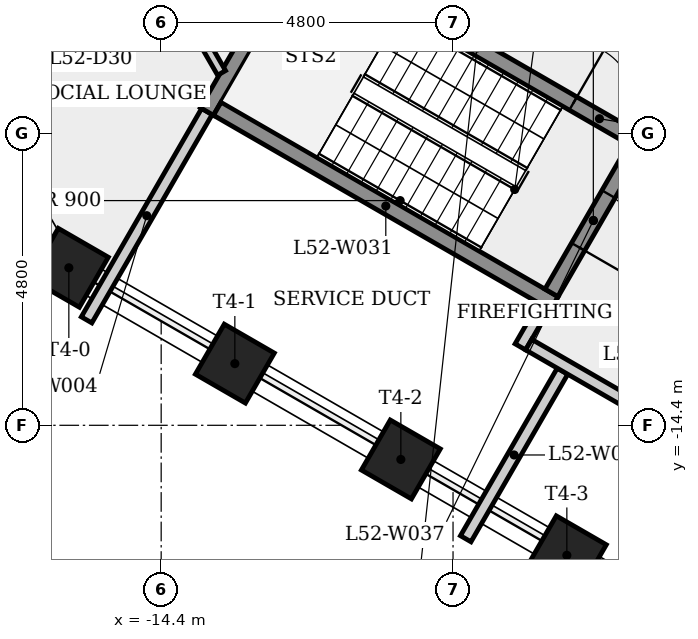
"""IFC4 building model, lengths in metres.
Left out: names, types, materials, properties, quantities, classifications, styles, units other than length and angle.
Written with IfcOpenShell. Run it as: python <this file> out.ifc"""

import sys

from ifc_helpers import new_model, si_unit, direction, frame, frame_2d, origin, origin_2d, place, context, subcontext, project, spatial, rectangle, extrude, element, fill, save


model = new_model("IFC4")
c1 = context("Model", 3, precision=1e-05, world=origin(), true_north=direction((0.0, 1.0)))
c2 = subcontext(c1, "Body", "Model", "MODEL_VIEW")
j1 = project(units=[si_unit("LENGTHUNIT", "METRE"), si_unit("PLANEANGLEUNIT", "RADIAN")], contexts=[c1])
p1 = place(None, origin())
s1 = spatial("IfcSite", under=j1, at=p1, CompositionType="ELEMENT")
p2 = place(p1, origin())
s2 = spatial("IfcBuilding", under=s1, at=p2, CompositionType="ELEMENT")
p3 = place(p2, frame((0.0, 0.0, 194.7)))
s3 = spatial("IfcBuildingStorey", under=s2, at=p3, CompositionType="ELEMENT", Elevation=194.7)
p4 = place(p3, frame((-9.35, -5.225, 0.0), z_axis=(0.0, 0.0, 1.0), x_axis=(0.866023993627, -0.500002442456, 0.0)))
e1 = element("IfcWall", 1, at=p4, inside=s3, PredefinedType="SHEAR", context=c2, shape_type="SweptSolid", body=[
    extrude(rectangle(XDim=10.97, YDim=0.6, at=frame_2d((5.485, 0.0))), origin(), (0.0, 0.0, 1.0), 4.0),
])
p5 = place(p4, frame((3.891, 0.0, 0.0)))
e2 = element("IfcOpeningElement", 2, at=p5, cuts=e1, PredefinedType="OPENING", context=c2, shape_type="SweptSolid", body=[
    extrude(rectangle(XDim=0.9, YDim=2.1, at=frame_2d((0.45, 1.05))), frame((0.0, 0.31, 0.0), z_axis=(0.0, -1.0, 0.0), x_axis=(1.0, 0.0, 0.0)), (0.0, 0.0, 1.0), 0.62),
])
p6 = place(p4, frame((9.018, 0.0, 0.0)))
e3 = element("IfcOpeningElement", 3, at=p6, cuts=e1, PredefinedType="OPENING", context=c2, shape_type="SweptSolid", body=[
    extrude(rectangle(XDim=0.9, YDim=2.1, at=frame_2d((0.45, 1.05))), frame((0.0, 0.31, 0.0), z_axis=(0.0, -1.0, 0.0), x_axis=(1.0, 0.0, 0.0)), (0.0, 0.0, 1.0), 0.62),
])
for number, where, z_axis, x_axis in (
    (4, (-15.918, -11.809, 0.0), (0.0, 0.0, 1.0), (-0.5, -0.866, 0.0)),
    (5, (-13.188, -13.386, 0.0), (0.0, 0.0, 1.0), (-0.5, -0.866, 0.0)),
    (6, (-10.458, -14.962, 0.0), (0.0, 0.0, 1.0), (-0.5, -0.866, 0.0)),
    (7, (-7.728, -16.538, 0.0), (0.0, 0.0, 1.0), (-0.5, -0.866, 0.0)),
):
    element("IfcColumn", number, at=place(p3, frame(where, z_axis=z_axis, x_axis=x_axis)), inside=s3, PredefinedType="COLUMN", context=c2, shape_type="SweptSolid", body=[
        extrude(rectangle(XDim=0.95, YDim=0.95, at=origin_2d()), origin(), (0.0, 0.0, 1.0), 4.0),
    ])
p7 = place(p3, frame((-15.627, -12.666, 0.0), z_axis=(0.0, 0.0, 1.0), x_axis=(0.499980548326, 0.866036633923, 0.0)))
e8 = element("IfcWall", 8, at=p7, inside=s3, PredefinedType="PLUMBINGWALL", context=c2, shape_type="SweptSolid", body=[
    extrude(rectangle(XDim=3.958, YDim=0.2, at=frame_2d((1.979, 0.0))), origin(), (0.0, 0.0, 1.0), 3.65),
])
p8 = place(p3, frame((-13.648, -9.239, 0.0), z_axis=(0.0, 0.0, 1.0), x_axis=(0.500017246033, 0.866015446554, 0.0)))
e9 = element("IfcWall", 9, at=p8, inside=s3, PredefinedType="SHEAR", context=c2, shape_type="SweptSolid", body=[
    extrude(rectangle(XDim=3.25, YDim=0.25, at=frame_2d((1.625, 0.0))), origin(), (0.0, 0.0, 1.0), 3.65),
])
p9 = place(p3, frame((-13.406, -8.604, 0.0), z_axis=(0.0, 0.0, 1.0), x_axis=(-0.499980611808, 0.866036597273, 0.0)))
e10 = element("IfcWall", 10, at=p9, inside=s3, PredefinedType="PARTITIONING", context=c2, shape_type="SweptSolid", body=[
    extrude(rectangle(XDim=3.493, YDim=0.15, at=frame_2d((1.747, 0.0))), origin(), (0.0, 0.0, 1.0), 3.65),
])
p10 = place(p9, frame((1.246, 0.0, 0.0)))
e11 = element("IfcOpeningElement", 11, at=p10, cuts=e10, PredefinedType="OPENING", context=c2, shape_type="SweptSolid", body=[
    extrude(rectangle(XDim=1.0, YDim=2.1, at=frame_2d((0.5, 1.05))), frame((0.0, 0.085, 0.0), z_axis=(0.0, -1.0, 0.0), x_axis=(1.0, 0.0, 0.0)), (0.0, 0.0, 1.0), 0.17),
])
p11 = place(p3, frame((-11.977, -6.595, 0.0), z_axis=(0.0, 0.0, 1.0), x_axis=(0.866025499775, -0.499999833739, 0.0)))
e12 = element("IfcWall", 12, at=p11, inside=s3, PredefinedType="SHEAR", context=c2, shape_type="SweptSolid", body=[
    extrude(rectangle(XDim=6.4, YDim=0.25, at=frame_2d((3.2, 0.0))), origin(), (0.0, 0.0, 1.0), 3.65),
])
p12 = place(p11, frame((5.025, 0.0, 0.0)))
e13 = element("IfcOpeningElement", 13, at=p12, cuts=e12, PredefinedType="OPENING", context=c2, shape_type="SweptSolid", body=[
    extrude(rectangle(XDim=1.0, YDim=2.1, at=frame_2d((0.5, 1.05))), frame((0.0, 0.135, 0.0), z_axis=(0.0, -1.0, 0.0), x_axis=(1.0, 0.0, 0.0)), (0.0, 0.0, 1.0), 0.27),
])
p13 = place(p3, frame((-8.493, -13.11, 0.0), z_axis=(0.0, 0.0, 1.0), x_axis=(0.500067724834, 0.865986299303, 0.0)))
e14 = element("IfcWall", 14, at=p13, inside=s3, PredefinedType="PLUMBINGWALL", context=c2, shape_type="SweptSolid", body=[
    extrude(rectangle(XDim=0.775, YDim=0.2, at=frame_2d((0.388, 0.0))), origin(), (0.0, 0.0, 1.0), 3.65),
])
p14 = place(p3, frame((-7.935, -12.393, 0.0), z_axis=(0.0, 0.0, 1.0), x_axis=(-0.866025499775, 0.499999833739, 0.0)))
e15 = element("IfcWall", 15, at=p14, inside=s3, PredefinedType="SHEAR", context=c2, shape_type="SweptSolid", body=[
    extrude(rectangle(XDim=6.4, YDim=0.25, at=frame_2d((3.2, 0.0))), origin(), (0.0, 0.0, 1.0), 3.65),
])
p15 = place(p3, frame((-7.8, -13.51, 0.0), z_axis=(0.0, 0.0, 1.0), x_axis=(-0.500016846771, -0.866015677078, 0.0)))
e16 = element("IfcWall", 16, at=p15, inside=s3, PredefinedType="PLUMBINGWALL", context=c2, shape_type="SweptSolid", body=[
    extrude(rectangle(XDim=3.183, YDim=0.2, at=frame_2d((1.591, 0.0))), origin(), (0.0, 0.0, 1.0), 3.65),
])
p16 = place(p3, frame((-8.356, -13.073, 0.0), z_axis=(0.0, 0.0, 1.0), x_axis=(0.866038532462, -0.499977259774, 0.0)))
e17 = element("IfcWall", 17, at=p16, inside=s3, PredefinedType="PLUMBINGWALL", context=c2, shape_type="SweptSolid", body=[
    extrude(rectangle(XDim=4.7, YDim=0.2, at=frame_2d((2.35, 0.0))), origin(), (0.0, 0.0, 1.0), 3.65),
])
p17 = place(p3, frame((-6.605, -9.841, 0.0), z_axis=(0.0, 0.0, 1.0), x_axis=(-0.499996545922, -0.866027397988, 0.0)))
e18 = element("IfcWall", 18, at=p17, inside=s3, PredefinedType="SHEAR", context=c2, shape_type="SweptSolid", body=[
    extrude(rectangle(XDim=2.75, YDim=0.25, at=frame_2d((1.375, 0.0))), origin(), (0.0, 0.0, 1.0), 3.65),
])
p18 = place(p17, frame((0.875, 0.0, 0.0)))
e19 = element("IfcOpeningElement", 19, at=p18, cuts=e18, PredefinedType="OPENING", context=c2, shape_type="SweptSolid", body=[
    extrude(rectangle(XDim=1.0, YDim=2.1, at=frame_2d((0.5, 1.05))), frame((0.0, 0.135, 0.0), z_axis=(0.0, -1.0, 0.0), x_axis=(1.0, 0.0, 0.0)), (0.0, 0.0, 1.0), 0.27),
])
p19 = place(p12, origin())
e20 = element("IfcDoor", 20, at=p19, inside=s3, OperationType="SINGLE_SWING_LEFT", PredefinedType="DOOR", context=c2, shape_type="SweptSolid", body=[
    extrude(rectangle(XDim=1.0, YDim=2.1, at=frame_2d((0.5, 1.05))), frame((0.0, 0.025, 0.0), z_axis=(0.0, -1.0, 0.0), x_axis=(1.0, 0.0, 0.0)), (0.0, 0.0, 1.0), 0.05),
])
fill(e13, e20)
p20 = place(p18, origin())
e21 = element("IfcDoor", 21, at=p20, inside=s3, OperationType="SINGLE_SWING_RIGHT", PredefinedType="DOOR", context=c2, shape_type="SweptSolid", body=[
    extrude(rectangle(XDim=1.0, YDim=2.1, at=frame_2d((0.5, 1.05))), frame((0.0, 0.025, 0.0), z_axis=(0.0, -1.0, 0.0), x_axis=(1.0, 0.0, 0.0)), (0.0, 0.0, 1.0), 0.05),
])
fill(e19, e21)
save(model, sys.argv[1])
